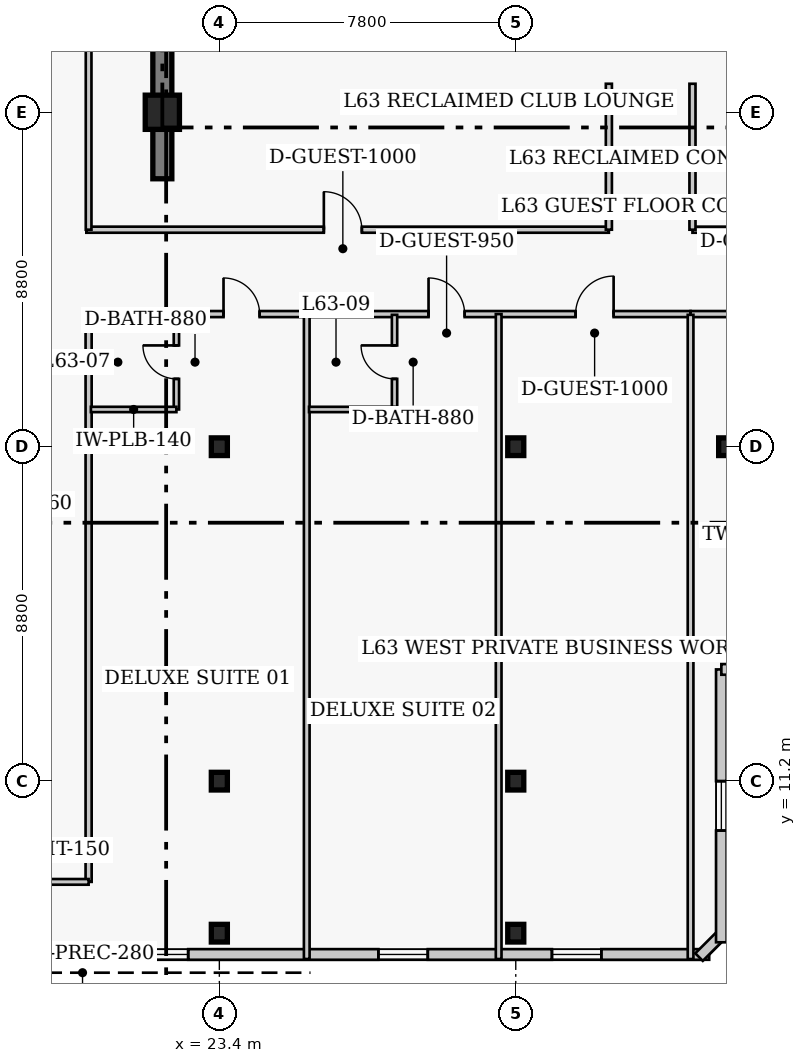
"""IFC4 building model, lengths in metres.
Left out: names, types, materials, properties, quantities, classifications, styles, units other than length and angle.
Written with IfcOpenShell. Run it as: python <this file> out.ifc"""

import sys

from ifc_helpers import new_model, si_unit, direction, frame, frame_2d, origin, origin_2d, place, context, subcontext, project, spatial, rectangle, i_section, extrude, element, fill, save


model = new_model("IFC4")
c1 = context("Model", 3, precision=1e-05, world=origin(), true_north=direction((0.0, 1.0)))
c2 = subcontext(c1, "Body", "Model", "MODEL_VIEW")
j1 = project(units=[si_unit("LENGTHUNIT", "METRE"), si_unit("PLANEANGLEUNIT", "RADIAN")], contexts=[c1])
p1 = place(None, origin())
s1 = spatial("IfcSite", under=j1, at=p1, CompositionType="ELEMENT")
p2 = place(p1, origin())
s2 = spatial("IfcBuilding", under=s1, at=p2, CompositionType="ELEMENT")
p3 = place(p2, frame((0.0, 0.0, 253.4)))
s3 = spatial("IfcBuildingStorey", under=s2, at=p3, CompositionType="ELEMENT", Elevation=253.4)
p4 = place(p3, frame((21.9, 27.05, 0.0), z_axis=(0.0, 0.0, 1.0), x_axis=(0.0, 1.0, 0.0)))
e1 = element("IfcWall", 1, at=p4, inside=s3, PredefinedType="SHEAR", context=c2, shape_type="SweptSolid", body=[
    extrude(rectangle(XDim=13.52, YDim=0.5, at=frame_2d((6.76, 0.0))), origin(), (0.0, 0.0, 1.0), 4.0),
])
for number, where, z_axis, x_axis in (
    (2, (23.4, 11.2, 0.0), (0.0, 0.0, 1.0), (1.0, 0.0, 0.0)),
    (3, (23.4, 20.0, 0.0), (0.0, 0.0, 1.0), (1.0, 0.0, 0.0)),
    (4, (31.2, 11.2, 0.0), (0.0, 0.0, 1.0), (1.0, 0.0, 0.0)),
    (5, (31.2, 20.0, 0.0), (0.0, 0.0, 1.0), (1.0, 0.0, 0.0)),
    (6, (36.75, 20.0, 0.0), (0.0, 0.0, 1.0), (1.0, 0.0, 0.0)),
):
    element("IfcColumn", number, at=place(p3, frame(where, z_axis=z_axis, x_axis=x_axis)), inside=s3, PredefinedType="COLUMN", context=c2, shape_type="SweptSolid", body=[
        extrude(i_section(OverallWidth=0.422, OverallDepth=0.465, WebThickness=0.045, FlangeThickness=0.073, FilletRadius=0.017, at=origin_2d()), origin(), (0.0, 0.0, 1.0), 4.0),
    ])
p5 = place(p3, frame((21.9, 28.8, 0.0), z_axis=(0.0, 0.0, 1.0), x_axis=(1.0, 0.0, 0.0)))
e7 = element("IfcColumn", 7, at=p5, inside=s3, PredefinedType="COLUMN", context=c2, shape_type="SweptSolid", body=[
    extrude(rectangle(XDim=0.9, YDim=0.9, at=origin_2d()), origin(), (0.0, 0.0, 1.0), 4.0),
])
for number, where, z_axis, x_axis in (
    (8, (23.4, 7.2, 0.0), (0.0, 0.0, 1.0), (1.0, 0.0, 0.0)),
    (9, (31.2, 7.2, 0.0), (0.0, 0.0, 1.0), (1.0, 0.0, 0.0)),
):
    element("IfcColumn", number, at=place(p3, frame(where, z_axis=z_axis, x_axis=x_axis)), inside=s3, PredefinedType="COLUMN", context=c2, shape_type="SweptSolid", body=[
        extrude(i_section(OverallWidth=0.422, OverallDepth=0.465, WebThickness=0.045, FlangeThickness=0.073, FilletRadius=0.017, at=origin_2d()), origin(), (0.0, 0.0, 1.0), 4.0),
    ])
p6 = place(p3, frame((11.46, 6.64, 0.0), z_axis=(0.0, 0.0, 1.0), x_axis=(1.0, 0.0, 0.0)))
e10 = element("IfcWall", 10, at=p6, inside=s3, PredefinedType="SOLIDWALL", context=c2, shape_type="SweptSolid", body=[
    extrude(rectangle(XDim=24.83, YDim=0.28, at=frame_2d((12.415, 0.0))), origin(), (0.0, 0.0, 1.0), 3.76),
])
p7 = place(p6, frame((3.488, 0.0, 0.85)))
e11 = element("IfcOpeningElement", 11, at=p7, cuts=e10, PredefinedType="OPENING", context=c2, shape_type="SweptSolid", body=[
    extrude(rectangle(XDim=1.3, YDim=1.7, at=frame_2d((0.65, 0.85))), frame((0.0, 0.15, 0.0), z_axis=(0.0, -1.0, 0.0), x_axis=(1.0, 0.0, 0.0)), (0.0, 0.0, 1.0), 0.3),
])
p8 = place(p6, frame((20.692, 0.0, 0.85)))
e12 = element("IfcOpeningElement", 12, at=p8, cuts=e10, PredefinedType="OPENING", context=c2, shape_type="SweptSolid", body=[
    extrude(rectangle(XDim=1.3, YDim=1.7, at=frame_2d((0.65, 0.85))), frame((0.0, 0.15, 0.0), z_axis=(0.0, -1.0, 0.0), x_axis=(1.0, 0.0, 0.0)), (0.0, 0.0, 1.0), 0.3),
])
p9 = place(p6, frame((9.82, 0.0, 0.85)))
e13 = element("IfcOpeningElement", 13, at=p9, cuts=e10, PredefinedType="OPENING", context=c2, shape_type="SweptSolid", body=[
    extrude(rectangle(XDim=1.3, YDim=1.7, at=frame_2d((0.65, 0.85))), frame((0.0, 0.15, 0.0), z_axis=(0.0, -1.0, 0.0), x_axis=(1.0, 0.0, 0.0)), (0.0, 0.0, 1.0), 0.3),
])
p10 = place(p6, frame((16.125, 0.0, 0.85)))
e14 = element("IfcOpeningElement", 14, at=p10, cuts=e10, PredefinedType="OPENING", context=c2, shape_type="SweptSolid", body=[
    extrude(rectangle(XDim=1.3, YDim=1.7, at=frame_2d((0.65, 0.85))), frame((0.0, 0.15, 0.0), z_axis=(0.0, -1.0, 0.0), x_axis=(1.0, 0.0, 0.0)), (0.0, 0.0, 1.0), 0.3),
])
p11 = place(p3, frame((36.023, 6.571, 0.0), z_axis=(0.0, 0.0, 1.0), x_axis=(0.707106781187, 0.707106781187, 0.0)))
e15 = element("IfcWall", 15, at=p11, inside=s3, PredefinedType="SOLIDWALL", context=c2, shape_type="SweptSolid", body=[
    extrude(rectangle(XDim=0.928, YDim=0.28, at=frame_2d((0.464, 0.0))), origin(), (0.0, 0.0, 1.0), 3.76),
])
p12 = place(p3, frame((36.61, 6.96, 0.0), z_axis=(0.0, 0.0, 1.0), x_axis=(0.0, 1.0, 0.0)))
e16 = element("IfcWall", 16, at=p12, inside=s3, PredefinedType="SOLIDWALL", context=c2, shape_type="SweptSolid", body=[
    extrude(rectangle(XDim=7.18, YDim=0.28, at=frame_2d((3.59, 0.0))), origin(), (0.0, 0.0, 1.0), 3.76),
])
p13 = place(p12, frame((2.94, 0.0, 0.85)))
e17 = element("IfcOpeningElement", 17, at=p13, cuts=e16, PredefinedType="OPENING", context=c2, shape_type="SweptSolid", body=[
    extrude(rectangle(XDim=1.3, YDim=1.7, at=frame_2d((0.65, 0.85))), frame((0.0, 0.15, 0.0), z_axis=(0.0, -1.0, 0.0), x_axis=(1.0, 0.0, 0.0)), (0.0, 0.0, 1.0), 0.3),
])
p14 = place(p3, frame((36.61, 14.14, 0.0), z_axis=(0.0, 0.0, 1.0), x_axis=(1.0, 0.0, 0.0)))
e18 = element("IfcWall", 18, at=p14, inside=s3, PredefinedType="SOLIDWALL", context=c2, shape_type="SweptSolid", body=[
    extrude(rectangle(XDim=4.78, YDim=0.28, at=frame_2d((2.39, 0.0))), origin(), (0.0, 0.0, 1.0), 3.76),
])
p15 = place(p14, frame((1.74, 0.0, 0.85)))
e19 = element("IfcOpeningElement", 19, at=p15, cuts=e18, PredefinedType="OPENING", context=c2, shape_type="SweptSolid", body=[
    extrude(rectangle(XDim=1.3, YDim=1.7, at=frame_2d((0.65, 0.85))), frame((0.0, 0.15, 0.0), z_axis=(0.0, -1.0, 0.0), x_axis=(1.0, 0.0, 0.0)), (0.0, 0.0, 1.0), 0.3),
])
p16 = place(p3, frame((19.9, 25.71, 0.0), z_axis=(0.0, 0.0, 1.0), x_axis=(1.0, 0.0, 0.0)))
e20 = element("IfcWall", 20, at=p16, inside=s3, PredefinedType="PARTITIONING", context=c2, shape_type="SweptSolid", body=[
    extrude(rectangle(XDim=13.75, YDim=0.16, at=frame_2d((6.875, 0.0))), origin(), (0.0, 0.0, 1.0), 3.76),
])
p17 = place(p16, frame((6.25, 0.0, 0.0)))
e21 = element("IfcOpeningElement", 21, at=p17, cuts=e20, PredefinedType="OPENING", context=c2, shape_type="SweptSolid", body=[
    extrude(rectangle(XDim=1.0, YDim=2.15, at=frame_2d((0.5, 1.075))), frame((0.0, 0.09, 0.0), z_axis=(0.0, -1.0, 0.0), x_axis=(1.0, 0.0, 0.0)), (0.0, 0.0, 1.0), 0.18),
])
p18 = place(p3, frame((35.85, 25.71, 0.0), z_axis=(0.0, 0.0, 1.0), x_axis=(1.0, 0.0, 0.0)))
e22 = element("IfcWall", 22, at=p18, inside=s3, PredefinedType="PARTITIONING", context=c2, shape_type="SweptSolid", body=[
    extrude(rectangle(XDim=23.45, YDim=0.16, at=frame_2d((11.725, 0.0))), origin(), (0.0, 0.0, 1.0), 3.76),
])
p19 = place(p18, frame((6.15, 0.0, 0.0)))
e23 = element("IfcOpeningElement", 23, at=p19, cuts=e22, PredefinedType="OPENING", context=c2, shape_type="SweptSolid", body=[
    extrude(rectangle(XDim=1.0, YDim=2.15, at=frame_2d((0.5, 1.075))), frame((0.0, 0.09, 0.0), z_axis=(0.0, -1.0, 0.0), x_axis=(1.0, 0.0, 0.0)), (0.0, 0.0, 1.0), 0.18),
])
p20 = place(p18, frame((13.65, 0.0, 0.0)))
e24 = element("IfcOpeningElement", 24, at=p20, cuts=e22, PredefinedType="OPENING", context=c2, shape_type="SweptSolid", body=[
    extrude(rectangle(XDim=1.0, YDim=2.15, at=frame_2d((0.5, 1.075))), frame((0.0, 0.09, 0.0), z_axis=(0.0, -1.0, 0.0), x_axis=(1.0, 0.0, 0.0)), (0.0, 0.0, 1.0), 0.18),
])
for number, where, z_axis, x_axis in (
    (25, (33.65, 25.71, 0.0), (0.0, 0.0, 1.0), (0.0, 1.0, 0.0)),
    (26, (35.85, 25.71, 0.0), (0.0, 0.0, 1.0), (0.0, 1.0, 0.0)),
):
    element("IfcWall", number, at=place(p3, frame(where, z_axis=z_axis, x_axis=x_axis)), inside=s3, PredefinedType="PARTITIONING", context=c2, shape_type="SweptSolid", body=[
        extrude(rectangle(XDim=3.84, YDim=0.16, at=frame_2d((1.92, 0.0))), origin(), (0.0, 0.0, 1.0), 3.76),
    ])
p21 = place(p3, frame((19.9, 23.49, 0.0), z_axis=(0.0, 0.0, 1.0), x_axis=(1.0, 0.0, 0.0)))
e27 = element("IfcWall", 27, at=p21, inside=s3, PredefinedType="PARTITIONING", context=c2, shape_type="SweptSolid", body=[
    extrude(rectangle(XDim=15.9, YDim=0.16, at=frame_2d((7.95, 0.0))), origin(), (0.0, 0.0, 1.0), 3.76),
])
p22 = place(p21, frame((3.61, 0.0, 0.0)))
e28 = element("IfcOpeningElement", 28, at=p22, cuts=e27, PredefinedType="OPENING", context=c2, shape_type="SweptSolid", body=[
    extrude(rectangle(XDim=0.95, YDim=2.1, at=frame_2d((0.475, 1.05))), frame((0.0, 0.09, 0.0), z_axis=(0.0, -1.0, 0.0), x_axis=(1.0, 0.0, 0.0)), (0.0, 0.0, 1.0), 0.18),
])
p23 = place(p21, frame((9.005, 0.0, 0.0)))
e29 = element("IfcOpeningElement", 29, at=p23, cuts=e27, PredefinedType="OPENING", context=c2, shape_type="SweptSolid", body=[
    extrude(rectangle(XDim=0.95, YDim=2.1, at=frame_2d((0.475, 1.05))), frame((0.0, 0.09, 0.0), z_axis=(0.0, -1.0, 0.0), x_axis=(1.0, 0.0, 0.0)), (0.0, 0.0, 1.0), 0.18),
])
p24 = place(p21, frame((12.875, 0.0, 0.0)))
e30 = element("IfcOpeningElement", 30, at=p24, cuts=e27, PredefinedType="OPENING", context=c2, shape_type="SweptSolid", body=[
    extrude(rectangle(XDim=1.0, YDim=2.15, at=frame_2d((0.5, 1.075))), frame((0.0, 0.09, 0.0), z_axis=(0.0, -1.0, 0.0), x_axis=(1.0, 0.0, 0.0)), (0.0, 0.0, 1.0), 0.18),
])
p25 = place(p3, frame((35.8, 23.49, 0.0), z_axis=(0.0, 0.0, 1.0), x_axis=(1.0, 0.0, 0.0)))
e31 = element("IfcWall", 31, at=p25, inside=s3, PredefinedType="PARTITIONING", context=c2, shape_type="SweptSolid", body=[
    extrude(rectangle(XDim=25.66, YDim=0.16, at=frame_2d((12.83, 0.0))), origin(), (0.0, 0.0, 1.0), 3.76),
])
p26 = place(p25, frame((1.555, 0.0, 0.0)))
e32 = element("IfcOpeningElement", 32, at=p26, cuts=e31, PredefinedType="OPENING", context=c2, shape_type="SweptSolid", body=[
    extrude(rectangle(XDim=0.95, YDim=2.1, at=frame_2d((0.475, 1.05))), frame((0.0, 0.09, 0.0), z_axis=(0.0, -1.0, 0.0), x_axis=(1.0, 0.0, 0.0)), (0.0, 0.0, 1.0), 0.18),
])
p27 = place(p25, frame((10.57, 0.0, 0.0)))
e33 = element("IfcOpeningElement", 33, at=p27, cuts=e31, PredefinedType="OPENING", context=c2, shape_type="SweptSolid", body=[
    extrude(rectangle(XDim=0.95, YDim=2.1, at=frame_2d((0.475, 1.05))), frame((0.0, 0.09, 0.0), z_axis=(0.0, -1.0, 0.0), x_axis=(1.0, 0.0, 0.0)), (0.0, 0.0, 1.0), 0.18),
])
p28 = place(p25, frame((15.105, 0.0, 0.0)))
e34 = element("IfcOpeningElement", 34, at=p28, cuts=e31, PredefinedType="OPENING", context=c2, shape_type="SweptSolid", body=[
    extrude(rectangle(XDim=1.0, YDim=2.15, at=frame_2d((0.5, 1.075))), frame((0.0, 0.09, 0.0), z_axis=(0.0, -1.0, 0.0), x_axis=(1.0, 0.0, 0.0)), (0.0, 0.0, 1.0), 0.18),
])
p29 = place(p25, frame((19.285, 0.0, 0.0)))
e35 = element("IfcOpeningElement", 35, at=p29, cuts=e31, PredefinedType="OPENING", context=c2, shape_type="SweptSolid", body=[
    extrude(rectangle(XDim=0.95, YDim=2.1, at=frame_2d((0.475, 1.05))), frame((0.0, 0.09, 0.0), z_axis=(0.0, -1.0, 0.0), x_axis=(1.0, 0.0, 0.0)), (0.0, 0.0, 1.0), 0.18),
])
p30 = place(p25, frame((24.115, 0.0, 0.0)))
e36 = element("IfcOpeningElement", 36, at=p30, cuts=e31, PredefinedType="OPENING", context=c2, shape_type="SweptSolid", body=[
    extrude(rectangle(XDim=0.95, YDim=2.1, at=frame_2d((0.475, 1.05))), frame((0.0, 0.09, 0.0), z_axis=(0.0, -1.0, 0.0), x_axis=(1.0, 0.0, 0.0)), (0.0, 0.0, 1.0), 0.18),
])
p31 = place(p3, frame((19.96, 8.55, 0.0), z_axis=(0.0, 0.0, 1.0), x_axis=(0.0, 1.0, 0.0)))
e37 = element("IfcWall", 37, at=p31, inside=s3, PredefinedType="PARTITIONING", context=c2, shape_type="SweptSolid", body=[
    extrude(rectangle(XDim=14.94, YDim=0.16, at=frame_2d((7.47, 0.0))), origin(), (0.0, 0.0, 1.0), 3.76),
])
p32 = place(p3, frame((17.74, 8.55, 0.0), z_axis=(0.0, 0.0, 1.0), x_axis=(1.0, 0.0, 0.0)))
e38 = element("IfcWall", 38, at=p32, inside=s3, PredefinedType="PARTITIONING", context=c2, shape_type="SweptSolid", body=[
    extrude(rectangle(XDim=2.22, YDim=0.15, at=frame_2d((1.11, 0.0))), origin(), (0.0, 0.0, 1.0), 3.76),
])
p33 = place(p3, frame((19.96, 25.71, 0.0), z_axis=(0.0, 0.0, 1.0), x_axis=(0.0, 1.0, 0.0)))
e39 = element("IfcWall", 39, at=p33, inside=s3, PredefinedType="PARTITIONING", context=c2, shape_type="SweptSolid", body=[
    extrude(rectangle(XDim=7.09, YDim=0.15, at=frame_2d((3.545, 0.0))), origin(), (0.0, 0.0, 1.0), 3.76),
])
p34 = place(p3, frame((22.27, 20.98, 0.0), z_axis=(0.0, 0.0, 1.0), x_axis=(0.0, 1.0, 0.0)))
e40 = element("IfcWall", 40, at=p34, inside=s3, PredefinedType="PLUMBINGWALL", context=c2, shape_type="SweptSolid", body=[
    extrude(rectangle(XDim=2.49, YDim=0.14, at=frame_2d((1.245, 0.0))), origin(), (0.0, 0.0, 1.0), 3.76),
])
p35 = place(p34, frame((0.805, 0.0, 0.0)))
e41 = element("IfcOpeningElement", 41, at=p35, cuts=e40, PredefinedType="OPENING", context=c2, shape_type="SweptSolid", body=[
    extrude(rectangle(XDim=0.88, YDim=2.05, at=frame_2d((0.44, 1.025))), frame((0.0, 0.08, 0.0), z_axis=(0.0, -1.0, 0.0), x_axis=(1.0, 0.0, 0.0)), (0.0, 0.0, 1.0), 0.16),
])
p36 = place(p3, frame((20.02, 20.98, 0.0), z_axis=(0.0, 0.0, 1.0), x_axis=(1.0, 0.0, 0.0)))
e42 = element("IfcWall", 42, at=p36, inside=s3, PredefinedType="PLUMBINGWALL", context=c2, shape_type="SweptSolid", body=[
    extrude(rectangle(XDim=2.25, YDim=0.14, at=frame_2d((1.125, 0.0))), origin(), (0.0, 0.0, 1.0), 3.76),
])
p37 = place(p3, frame((25.7, 6.52, 0.0), z_axis=(0.0, 0.0, 1.0), x_axis=(0.0, 1.0, 0.0)))
e43 = element("IfcWall", 43, at=p37, inside=s3, PredefinedType="PARTITIONING", context=c2, shape_type="SweptSolid", body=[
    extrude(rectangle(XDim=16.97, YDim=0.15, at=frame_2d((8.485, 0.0))), origin(), (0.0, 0.0, 1.0), 3.76),
])
p38 = place(p3, frame((28.01, 20.98, 0.0), z_axis=(0.0, 0.0, 1.0), x_axis=(0.0, 1.0, 0.0)))
e44 = element("IfcWall", 44, at=p38, inside=s3, PredefinedType="PLUMBINGWALL", context=c2, shape_type="SweptSolid", body=[
    extrude(rectangle(XDim=2.49, YDim=0.14, at=frame_2d((1.245, 0.0))), origin(), (0.0, 0.0, 1.0), 3.76),
])
p39 = place(p38, frame((0.805, 0.0, 0.0)))
e45 = element("IfcOpeningElement", 45, at=p39, cuts=e44, PredefinedType="OPENING", context=c2, shape_type="SweptSolid", body=[
    extrude(rectangle(XDim=0.88, YDim=2.05, at=frame_2d((0.44, 1.025))), frame((0.0, 0.08, 0.0), z_axis=(0.0, -1.0, 0.0), x_axis=(1.0, 0.0, 0.0)), (0.0, 0.0, 1.0), 0.16),
])
p40 = place(p3, frame((25.76, 20.98, 0.0), z_axis=(0.0, 0.0, 1.0), x_axis=(1.0, 0.0, 0.0)))
e46 = element("IfcWall", 46, at=p40, inside=s3, PredefinedType="PLUMBINGWALL", context=c2, shape_type="SweptSolid", body=[
    extrude(rectangle(XDim=2.25, YDim=0.14, at=frame_2d((1.125, 0.0))), origin(), (0.0, 0.0, 1.0), 3.76),
])
p41 = place(p3, frame((30.75, 6.52, 0.0), z_axis=(0.0, 0.0, 1.0), x_axis=(0.0, 1.0, 0.0)))
e47 = element("IfcWall", 47, at=p41, inside=s3, PredefinedType="PARTITIONING", context=c2, shape_type="SweptSolid", body=[
    extrude(rectangle(XDim=16.97, YDim=0.15, at=frame_2d((8.485, 0.0))), origin(), (0.0, 0.0, 1.0), 3.76),
])
p42 = place(p3, frame((35.8, 6.52, 0.0), z_axis=(0.0, 0.0, 1.0), x_axis=(0.0, 1.0, 0.0)))
e48 = element("IfcWall", 48, at=p42, inside=s3, PredefinedType="PARTITIONING", context=c2, shape_type="SweptSolid", body=[
    extrude(rectangle(XDim=16.95, YDim=0.15, at=frame_2d((8.475, 0.0))), origin(), (0.0, 0.0, 1.0), 3.76),
])
p43 = place(p8, origin())
e49 = element("IfcWindow", 49, at=p43, inside=s3, PartitioningType="SINGLE_PANEL", PredefinedType="WINDOW", context=c2, shape_type="SweptSolid", body=[
    extrude(rectangle(XDim=1.3, YDim=1.7, at=frame_2d((0.65, 0.85))), frame((0.0, 0.03, 0.0), z_axis=(0.0, -1.0, 0.0), x_axis=(1.0, 0.0, 0.0)), (0.0, 0.0, 1.0), 0.06),
])
fill(e12, e49)
p44 = place(p13, origin())
e50 = element("IfcWindow", 50, at=p44, inside=s3, PartitioningType="SINGLE_PANEL", PredefinedType="WINDOW", context=c2, shape_type="SweptSolid", body=[
    extrude(rectangle(XDim=1.3, YDim=1.7, at=frame_2d((0.65, 0.85))), frame((0.0, 0.03, 0.0), z_axis=(0.0, -1.0, 0.0), x_axis=(1.0, 0.0, 0.0)), (0.0, 0.0, 1.0), 0.06),
])
fill(e17, e50)
p45 = place(p9, origin())
e51 = element("IfcWindow", 51, at=p45, inside=s3, PartitioningType="SINGLE_PANEL", PredefinedType="WINDOW", context=c2, shape_type="SweptSolid", body=[
    extrude(rectangle(XDim=1.3, YDim=1.7, at=frame_2d((0.65, 0.85))), frame((0.0, 0.03, 0.0), z_axis=(0.0, -1.0, 0.0), x_axis=(1.0, 0.0, 0.0)), (0.0, 0.0, 1.0), 0.06),
])
fill(e13, e51)
p46 = place(p10, origin())
e52 = element("IfcWindow", 52, at=p46, inside=s3, PartitioningType="SINGLE_PANEL", PredefinedType="WINDOW", context=c2, shape_type="SweptSolid", body=[
    extrude(rectangle(XDim=1.3, YDim=1.7, at=frame_2d((0.65, 0.85))), frame((0.0, 0.03, 0.0), z_axis=(0.0, -1.0, 0.0), x_axis=(1.0, 0.0, 0.0)), (0.0, 0.0, 1.0), 0.06),
])
fill(e14, e52)
p47 = place(p17, origin())
e53 = element("IfcDoor", 53, at=p47, inside=s3, OperationType="SINGLE_SWING_LEFT", PredefinedType="DOOR", context=c2, shape_type="SweptSolid", body=[
    extrude(rectangle(XDim=1.0, YDim=2.15, at=frame_2d((0.5, 1.075))), frame((0.0, 0.025, 0.0), z_axis=(0.0, -1.0, 0.0), x_axis=(1.0, 0.0, 0.0)), (0.0, 0.0, 1.0), 0.05),
])
fill(e21, e53)
p48 = place(p35, origin())
e54 = element("IfcDoor", 54, at=p48, inside=s3, OperationType="SINGLE_SWING_RIGHT", PredefinedType="DOOR", context=c2, shape_type="SweptSolid", body=[
    extrude(rectangle(XDim=0.88, YDim=2.05, at=frame_2d((0.44, 1.025))), frame((0.0, 0.025, 0.0), z_axis=(0.0, -1.0, 0.0), x_axis=(1.0, 0.0, 0.0)), (0.0, 0.0, 1.0), 0.05),
])
fill(e41, e54)
p49 = place(p22, origin())
e55 = element("IfcDoor", 55, at=p49, inside=s3, OperationType="SINGLE_SWING_LEFT", PredefinedType="DOOR", context=c2, shape_type="SweptSolid", body=[
    extrude(rectangle(XDim=0.95, YDim=2.1, at=frame_2d((0.475, 1.05))), frame((0.0, 0.025, 0.0), z_axis=(0.0, -1.0, 0.0), x_axis=(1.0, 0.0, 0.0)), (0.0, 0.0, 1.0), 0.05),
])
fill(e28, e55)
p50 = place(p39, origin())
e56 = element("IfcDoor", 56, at=p50, inside=s3, OperationType="SINGLE_SWING_RIGHT", PredefinedType="DOOR", context=c2, shape_type="SweptSolid", body=[
    extrude(rectangle(XDim=0.88, YDim=2.05, at=frame_2d((0.44, 1.025))), frame((0.0, 0.025, 0.0), z_axis=(0.0, -1.0, 0.0), x_axis=(1.0, 0.0, 0.0)), (0.0, 0.0, 1.0), 0.05),
])
fill(e45, e56)
p51 = place(p23, origin())
e57 = element("IfcDoor", 57, at=p51, inside=s3, OperationType="SINGLE_SWING_LEFT", PredefinedType="DOOR", context=c2, shape_type="SweptSolid", body=[
    extrude(rectangle(XDim=0.95, YDim=2.1, at=frame_2d((0.475, 1.05))), frame((0.0, 0.025, 0.0), z_axis=(0.0, -1.0, 0.0), x_axis=(1.0, 0.0, 0.0)), (0.0, 0.0, 1.0), 0.05),
])
fill(e29, e57)
p52 = place(p24, origin())
e58 = element("IfcDoor", 58, at=p52, inside=s3, OperationType="SINGLE_SWING_RIGHT", PredefinedType="DOOR", context=c2, shape_type="SweptSolid", body=[
    extrude(rectangle(XDim=1.0, YDim=2.15, at=frame_2d((0.5, 1.075))), frame((0.0, 0.025, 0.0), z_axis=(0.0, -1.0, 0.0), x_axis=(1.0, 0.0, 0.0)), (0.0, 0.0, 1.0), 0.05),
])
fill(e30, e58)
save(model, sys.argv[1])
